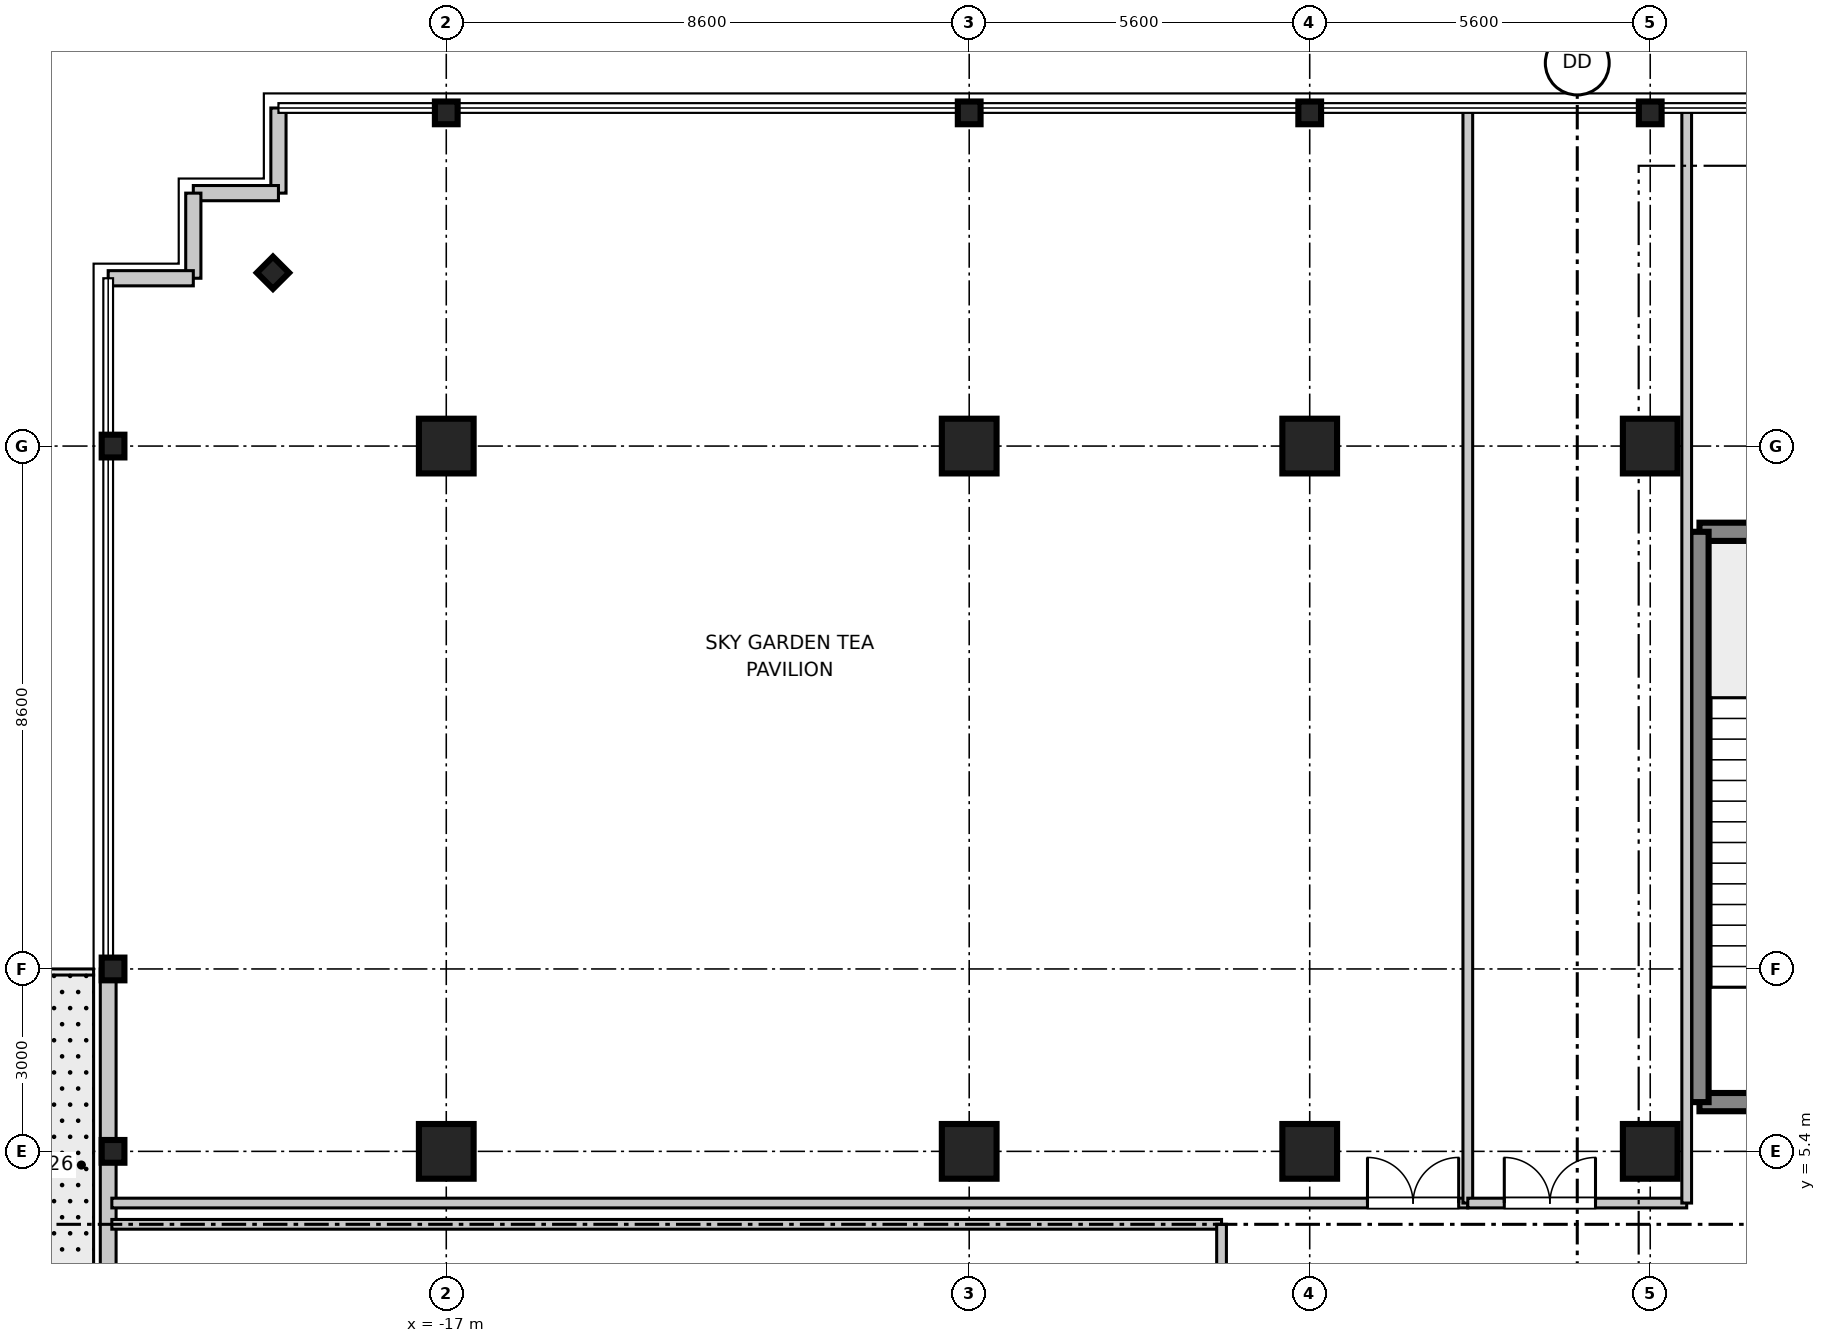
"""IFC4 building model, lengths in metres.
Left out: names, types, materials, properties, quantities, classifications, styles, units other than length and angle.
Written with IfcOpenShell. Run it as: python <this file> out.ifc"""

import sys

from ifc_helpers import new_model, si_unit, direction, frame, frame_2d, origin, origin_2d, place, context, subcontext, project, spatial, rectangle, i_section, extrude, source, transform, mapped, element, fill, save


model = new_model("IFC4")
c1 = context("Model", 3, precision=1e-05, world=origin(), true_north=direction((0.0, 1.0)))
c2 = subcontext(c1, "Body", "Model", "MODEL_VIEW")
j1 = project(units=[si_unit("LENGTHUNIT", "METRE"), si_unit("PLANEANGLEUNIT", "RADIAN")], contexts=[c1])
p1 = place(None, origin())
s1 = spatial("IfcSite", under=j1, at=p1, CompositionType="ELEMENT")
p2 = place(p1, origin())
s2 = spatial("IfcBuilding", under=s1, at=p2, CompositionType="ELEMENT")
p3 = place(p2, frame((0.0, 0.0, 352.05)))
s3 = spatial("IfcBuildingStorey", under=s2, at=p3, CompositionType="ELEMENT", Elevation=352.05)
m1 = source(origin(), c2, "Body", "SweptSolid", [
    extrude(rectangle(XDim=0.9, YDim=0.9, at=origin_2d()), origin(), (0.0, 0.0, 1.0), 4.955),
])
for number, where, z_axis, x_axis in (
    (1, (-17.0, 5.4, 0.0), (0.0, 0.0, 1.0), (1.0, 0.0, 0.0)),
    (2, (-17.0, 17.0, 0.0), (0.0, 0.0, 1.0), (1.0, 0.0, 0.0)),
    (3, (-8.4, 5.4, 0.0), (0.0, 0.0, 1.0), (1.0, 0.0, 0.0)),
    (4, (-8.4, 17.0, 0.0), (0.0, 0.0, 1.0), (1.0, 0.0, 0.0)),
    (5, (-2.8, 5.4, 0.0), (0.0, 0.0, 1.0), (1.0, 0.0, 0.0)),
    (6, (-2.8, 17.0, 0.0), (0.0, 0.0, 1.0), (1.0, 0.0, 0.0)),
    (7, (2.8, 5.4, 0.0), (0.0, 0.0, 1.0), (1.0, 0.0, 0.0)),
    (8, (2.8, 17.0, 0.0), (0.0, 0.0, 1.0), (1.0, 0.0, 0.0)),
):
    element("IfcColumn", number, at=place(p3, frame(where, z_axis=z_axis, x_axis=x_axis)), inside=s3, PredefinedType="COLUMN", context=c2, shape_type="MappedRepresentation", body=[
        mapped(m1, transform((0.0, 0.0, 0.0), scale=1.0)),
    ])
m2 = source(origin(), c2, "Body", "SweptSolid", [
    extrude(i_section(OverallWidth=0.374, OverallDepth=0.374, WebThickness=0.014, FlangeThickness=0.023, at=origin_2d()), origin(), (0.0, 0.0, 1.0), 4.955),
])
for number, where, z_axis, x_axis in (
    (9, (-22.48, 5.4, 0.0), (0.0, 0.0, 1.0), (1.0, 0.0, 0.0)),
    (10, (-22.48, 8.4, 0.0), (0.0, 0.0, 1.0), (1.0, 0.0, 0.0)),
    (11, (-22.48, 17.0, 0.0), (0.0, 0.0, 1.0), (1.0, 0.0, 0.0)),
    (12, (-17.0, 22.48, 0.0), (0.0, 0.0, 1.0), (0.0, 1.0, 0.0)),
    (13, (-8.4, 22.48, 0.0), (0.0, 0.0, 1.0), (0.0, 1.0, 0.0)),
    (14, (-2.8, 22.48, 0.0), (0.0, 0.0, 1.0), (0.0, 1.0, 0.0)),
    (15, (2.8, 22.48, 0.0), (0.0, 0.0, 1.0), (0.0, 1.0, 0.0)),
    (16, (-19.85, 19.85, 0.0), (0.0, 0.0, 1.0), (0.707, 0.707, 0.0)),
):
    element("IfcColumn", number, at=place(p3, frame(where, z_axis=z_axis, x_axis=x_axis)), inside=s3, PredefinedType="COLUMN", context=c2, shape_type="MappedRepresentation", body=[
        mapped(m2, transform((0.0, 0.0, 0.0), scale=1.0)),
    ])
m3 = source(origin(), c2, "Body", "SweptSolid", [
    extrude(rectangle(XDim=3.98, YDim=0.3, at=frame_2d((1.99, 0.0))), origin(), (0.0, 0.0, 1.0), 4.7),
])
for number, where, z_axis, x_axis in (
    (17, (3.61, 6.21, 0.0), (0.0, 0.0, 1.0), (1.0, 0.0, 0.0)),
    (18, (3.61, 15.59, 0.0), (0.0, 0.0, 1.0), (1.0, 0.0, 0.0)),
):
    element("IfcWall", number, at=place(p3, frame(where, z_axis=z_axis, x_axis=x_axis)), inside=s3, PredefinedType="SHEAR", context=c2, shape_type="MappedRepresentation", body=[
        mapped(m3, transform((0.0, 0.0, 0.0), scale=1.0)),
    ])
m4 = source(origin(), c2, "Body", "SweptSolid", [
    extrude(rectangle(XDim=9.38, YDim=0.3, at=frame_2d((4.69, 0.0))), origin(), (0.0, 0.0, 1.0), 4.7),
])
p4 = place(p3, frame((3.61, 6.21, 0.0), z_axis=(0.0, 0.0, 1.0), x_axis=(0.0, 1.0, 0.0)))
e19 = element("IfcWall", 19, at=p4, inside=s3, PredefinedType="SHEAR", context=c2, shape_type="MappedRepresentation", body=[
    mapped(m4, transform((0.0, 0.0, 0.0), scale=1.0)),
])
m5 = source(origin(), c2, "Body", "SweptSolid", [
    extrude(rectangle(XDim=1.4, YDim=0.25, at=frame_2d((0.7, 0.0))), origin(), (0.0, 0.0, 1.0), 4.7),
])
p5 = place(p3, frame((-19.76, 21.16, 0.0), z_axis=(0.0, 0.0, 1.0), x_axis=(0.0, 1.0, 0.0)))
e20 = element("IfcWall", 20, at=p5, inside=s3, PredefinedType="STANDARD", context=c2, shape_type="MappedRepresentation", body=[
    mapped(m5, transform((0.0, 0.0, 0.0), scale=1.0)),
])
m6 = source(origin(), c2, "Body", "SweptSolid", [
    extrude(rectangle(XDim=1.4, YDim=0.25, at=frame_2d((0.7, 0.0))), origin(), (0.0, 0.0, 1.0), 4.7),
])
for number, where, z_axis, x_axis in (
    (21, (-21.16, 21.16, 0.0), (0.0, 0.0, 1.0), (1.0, 0.0, 0.0)),
    (22, (-21.16, 19.76, 0.0), (0.0, 0.0, 1.0), (0.0, 1.0, 0.0)),
):
    element("IfcWall", number, at=place(p3, frame(where, z_axis=z_axis, x_axis=x_axis)), inside=s3, PredefinedType="STANDARD", context=c2, shape_type="MappedRepresentation", body=[
        mapped(m6, transform((0.0, 0.0, 0.0), scale=1.0)),
    ])
p6 = place(p3, frame((-22.56, 19.76, 0.0), z_axis=(0.0, 0.0, 1.0), x_axis=(1.0, 0.0, 0.0)))
e23 = element("IfcWall", 23, at=p6, inside=s3, PredefinedType="STANDARD", context=c2, shape_type="MappedRepresentation", body=[
    mapped(m5, transform((0.0, 0.0, 0.0), scale=1.0)),
])
m7 = source(origin(), c2, "Body", "SweptSolid", [
    extrude(rectangle(XDim=16.8, YDim=0.26, at=frame_2d((8.4, 0.0))), origin(), (0.0, 0.0, 1.0), 4.18),
])
p7 = place(p3, frame((-22.56, -8.4, 0.0), z_axis=(0.0, 0.0, 1.0), x_axis=(0.0, 1.0, 0.0)))
e24 = element("IfcWall", 24, at=p7, inside=s3, PredefinedType="STANDARD", context=c2, shape_type="MappedRepresentation", body=[
    mapped(m7, transform((0.0, 0.0, 0.0), scale=1.0)),
])
p8 = place(p7, frame((8.4, 0.0, 0.0)))
e25 = element("IfcOpeningElement", 25, at=p8, cuts=e24, PredefinedType="OPENING", context=c2, shape_type="SweptSolid", body=[
    extrude(rectangle(XDim=1.8, YDim=2.25, at=frame_2d((0.9, 1.125))), frame((0.0, 0.14, 0.0), z_axis=(0.0, -1.0, 0.0), x_axis=(1.0, 0.0, 0.0)), (0.0, 0.0, 1.0), 0.28),
])
p9 = place(p7, frame((4.125, 0.0, 0.85)))
e26 = element("IfcOpeningElement", 26, at=p9, cuts=e24, PredefinedType="OPENING", context=c2, shape_type="SweptSolid", body=[
    extrude(rectangle(XDim=1.6, YDim=1.8, at=frame_2d((0.8, 0.9))), frame((0.0, 0.14, 0.0), z_axis=(0.0, -1.0, 0.0), x_axis=(1.0, 0.0, 0.0)), (0.0, 0.0, 1.0), 0.28),
])
m8 = source(origin(), c2, "Body", "SweptSolid", [
    extrude(rectangle(XDim=18.25, YDim=0.16, at=frame_2d((9.125, 0.0))), origin(), (0.0, 0.0, 1.0), 3.4),
])
p10 = place(p3, frame((-22.5, 4.2, 0.0), z_axis=(0.0, 0.0, 1.0), x_axis=(1.0, 0.0, 0.0)))
e27 = element("IfcWall", 27, at=p10, inside=s3, PredefinedType="PARTITIONING", context=c2, shape_type="MappedRepresentation", body=[
    mapped(m8, transform((0.0, 0.0, 0.0), scale=1.0)),
])
m9 = source(origin(), c2, "Body", "SweptSolid", [
    extrude(rectangle(XDim=6.6, YDim=0.16, at=frame_2d((3.3, 0.0))), origin(), (0.0, 0.0, 1.0), 3.4),
])
p11 = place(p3, frame((-4.25, -2.4, 0.0), z_axis=(0.0, 0.0, 1.0), x_axis=(0.0, 1.0, 0.0)))
e28 = element("IfcWall", 28, at=p11, inside=s3, PredefinedType="PARTITIONING", context=c2, shape_type="MappedRepresentation", body=[
    mapped(m9, transform((0.0, 0.0, 0.0), scale=1.0)),
])
p12 = place(p11, frame((1.628, 0.0, 0.0)))
e29 = element("IfcOpeningElement", 29, at=p12, cuts=e28, PredefinedType="OPENING", context=c2, shape_type="SweptSolid", body=[
    extrude(rectangle(XDim=1.5, YDim=2.15, at=frame_2d((0.75, 1.075))), frame((0.0, 0.09, 0.0), z_axis=(0.0, -1.0, 0.0), x_axis=(1.0, 0.0, 0.0)), (0.0, 0.0, 1.0), 0.18),
])
m10 = source(origin(), c2, "Body", "SweptSolid", [
    extrude(rectangle(XDim=22.3, YDim=0.16, at=frame_2d((11.15, 0.0))), origin(), (0.0, 0.0, 1.0), 3.4),
])
p13 = place(p3, frame((-22.5, 4.55, 0.0), z_axis=(0.0, 0.0, 1.0), x_axis=(1.0, 0.0, 0.0)))
e30 = element("IfcWall", 30, at=p13, inside=s3, PredefinedType="PARTITIONING", context=c2, shape_type="MappedRepresentation", body=[
    mapped(m10, transform((0.0, 0.0, 0.0), scale=1.0)),
])
p14 = place(p13, frame((20.65, 0.0, 0.0)))
e31 = element("IfcOpeningElement", 31, at=p14, cuts=e30, PredefinedType="OPENING", context=c2, shape_type="SweptSolid", body=[
    extrude(rectangle(XDim=1.5, YDim=2.15, at=frame_2d((0.75, 1.075))), frame((0.0, 0.09, 0.0), z_axis=(0.0, -1.0, 0.0), x_axis=(1.0, 0.0, 0.0)), (0.0, 0.0, 1.0), 0.18),
])
m11 = source(origin(), c2, "Body", "SweptSolid", [
    extrude(rectangle(XDim=17.95, YDim=0.16, at=frame_2d((8.975, 0.0))), origin(), (0.0, 0.0, 1.0), 3.4),
])
p15 = place(p3, frame((-0.2, 4.55, 0.0), z_axis=(0.0, 0.0, 1.0), x_axis=(0.0, 1.0, 0.0)))
e32 = element("IfcWall", 32, at=p15, inside=s3, PredefinedType="PARTITIONING", context=c2, shape_type="MappedRepresentation", body=[
    mapped(m11, transform((0.0, 0.0, 0.0), scale=1.0)),
])
m12 = source(origin(), c2, "Body", "SweptSolid", [
    extrude(rectangle(XDim=3.6, YDim=0.16, at=frame_2d((1.8, 0.0))), origin(), (0.0, 0.0, 1.0), 3.4),
])
p16 = place(p3, frame((-0.2, 4.55, 0.0), z_axis=(0.0, 0.0, 1.0), x_axis=(1.0, 0.0, 0.0)))
e33 = element("IfcWall", 33, at=p16, inside=s3, PredefinedType="PARTITIONING", context=c2, shape_type="MappedRepresentation", body=[
    mapped(m12, transform((0.0, 0.0, 0.0), scale=1.0)),
])
p17 = place(p16, frame((0.6, 0.0, 0.0)))
e34 = element("IfcOpeningElement", 34, at=p17, cuts=e33, PredefinedType="OPENING", context=c2, shape_type="SweptSolid", body=[
    extrude(rectangle(XDim=1.5, YDim=2.15, at=frame_2d((0.75, 1.075))), frame((0.0, 0.09, 0.0), z_axis=(0.0, -1.0, 0.0), x_axis=(1.0, 0.0, 0.0)), (0.0, 0.0, 1.0), 0.18),
])
p18 = place(p3, frame((3.4, 4.55, 0.0), z_axis=(0.0, 0.0, 1.0), x_axis=(0.0, 1.0, 0.0)))
e35 = element("IfcWall", 35, at=p18, inside=s3, PredefinedType="PARTITIONING", context=c2, shape_type="MappedRepresentation", body=[
    mapped(m11, transform((0.0, 0.0, 0.0), scale=1.0)),
])
m13 = source(origin(), c2, "Body", "SweptSolid", [
    extrude(rectangle(XDim=1.5, YDim=2.15, at=frame_2d((0.75, 1.075))), frame((0.0, 0.025, 0.0), z_axis=(0.0, -1.0, 0.0), x_axis=(1.0, 0.0, 0.0)), (0.0, 0.0, 1.0), 0.05),
])
p19 = place(p14, origin())
e36 = element("IfcDoor", 36, at=p19, inside=s3, OperationType="DOUBLE_DOOR_SINGLE_SWING", PredefinedType="DOOR", context=c2, shape_type="MappedRepresentation", body=[
    mapped(m13, transform((0.0, 0.0, 0.0), scale=1.0)),
])
fill(e31, e36)
p20 = place(p17, origin())
e37 = element("IfcDoor", 37, at=p20, inside=s3, OperationType="DOUBLE_DOOR_SINGLE_SWING", PredefinedType="DOOR", context=c2, shape_type="MappedRepresentation", body=[
    mapped(m13, transform((0.0, 0.0, 0.0), scale=1.0)),
])
fill(e34, e37)
save(model, sys.argv[1])
